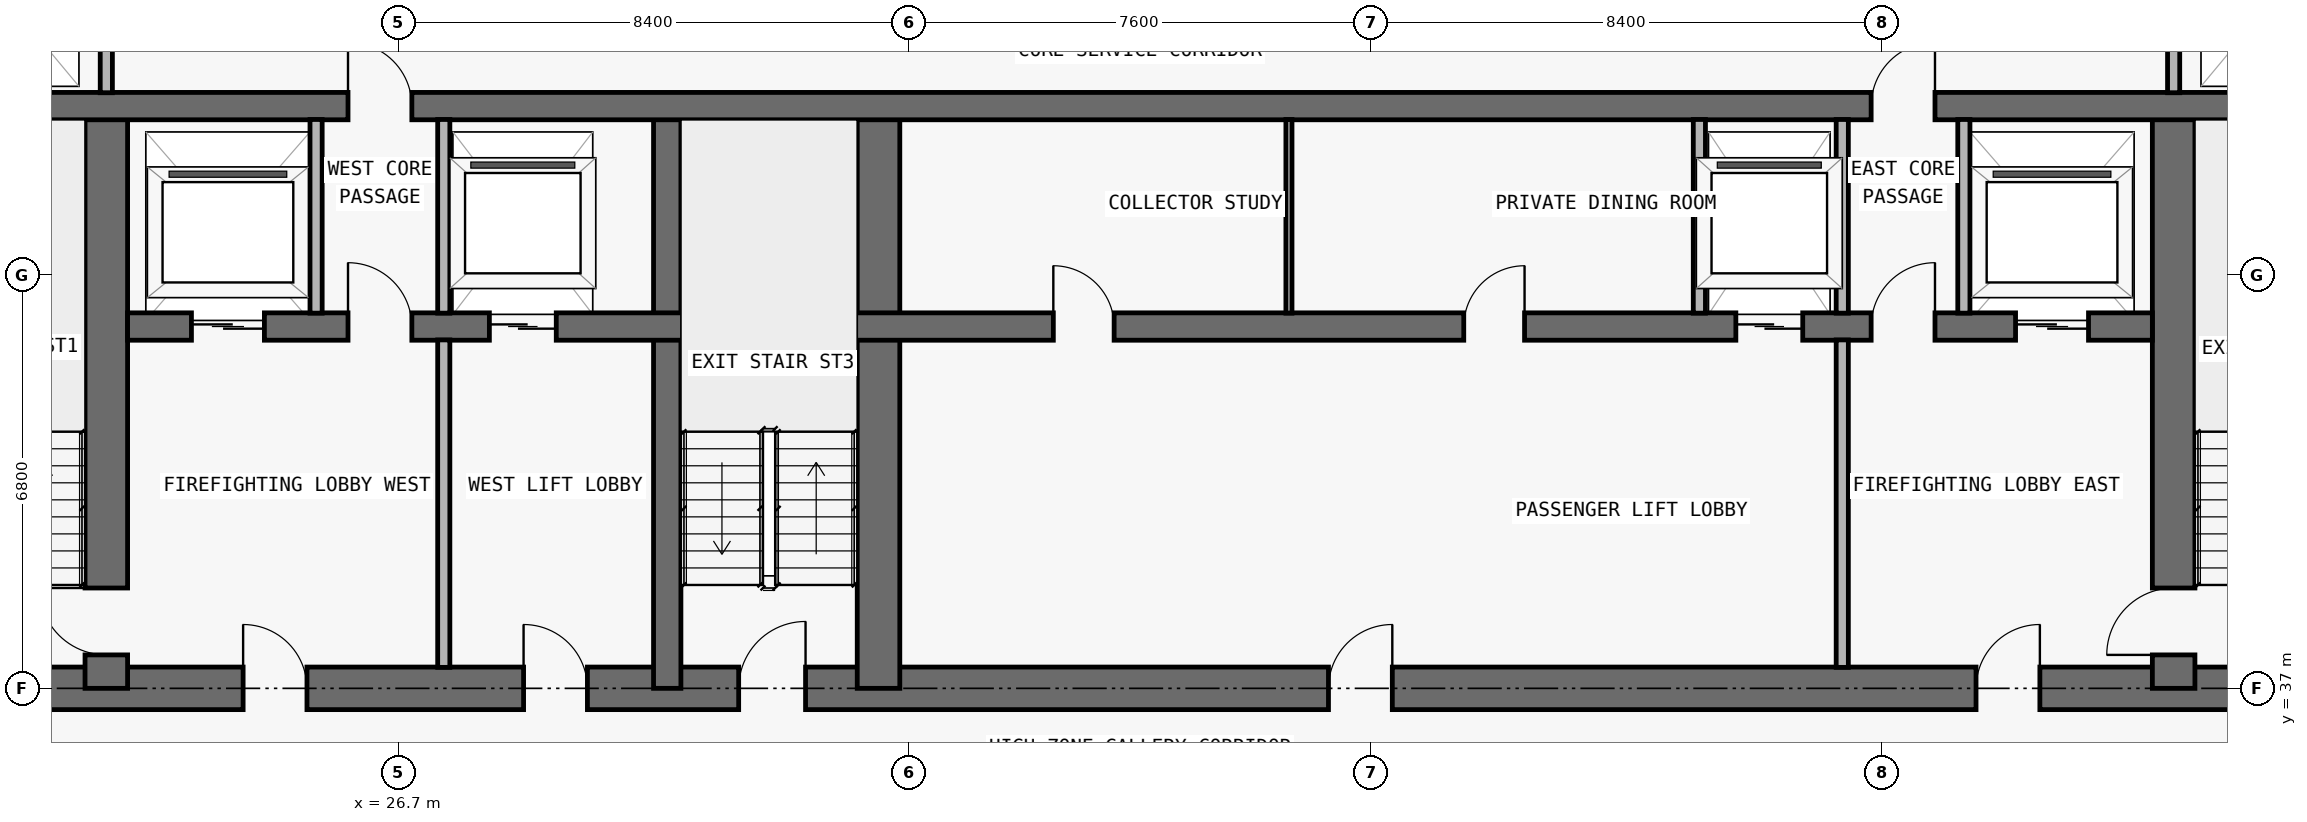
"""IFC4 building model, lengths in metres.
Left out: names, types, materials, properties, quantities, classifications, styles, units other than length and angle.
Written with IfcOpenShell. Run it as: python <this file> out.ifc"""

import sys

from ifc_helpers import new_model, si_unit, direction, frame, frame_2d, origin, place, context, subcontext, project, spatial, rectangle, extrude, element, fill, save


model = new_model("IFC4")
c1 = context("Model", 3, precision=1e-05, world=origin(), true_north=direction((0.0, 1.0)))
c2 = subcontext(c1, "Body", "Model", "MODEL_VIEW")
j1 = project(units=[si_unit("LENGTHUNIT", "METRE"), si_unit("PLANEANGLEUNIT", "RADIAN")], contexts=[c1])
p1 = place(None, origin())
s1 = spatial("IfcSite", under=j1, at=p1, CompositionType="ELEMENT")
p2 = place(p1, origin())
s2 = spatial("IfcBuilding", under=s1, at=p2, CompositionType="ELEMENT")
p3 = place(p2, frame((0.0, 0.0, 214.8)))
s3 = spatial("IfcBuildingStorey", under=s2, at=p3, CompositionType="ELEMENT", Elevation=214.8)
p4 = place(p3, frame((17.95, 37.0, 0.0), z_axis=(0.0, 0.0, 1.0), x_axis=(1.0, 0.0, 0.0)))
e1 = element("IfcWall", 1, at=p4, inside=s3, PredefinedType="SHEAR", context=c2, shape_type="SweptSolid", body=[
    extrude(rectangle(XDim=41.9, YDim=0.7, at=frame_2d((20.95, 0.0))), origin(), (0.0, 0.0, 1.0), 3.05),
])
p5 = place(p4, frame((14.35, 0.0, 0.0)))
e2 = element("IfcOpeningElement", 2, at=p5, cuts=e1, PredefinedType="OPENING", context=c2, shape_type="SweptSolid", body=[
    extrude(rectangle(XDim=1.1, YDim=2.15, at=frame_2d((0.55, 1.075))), frame((0.0, 0.36, 0.0), z_axis=(0.0, -1.0, 0.0), x_axis=(1.0, 0.0, 0.0)), (0.0, 0.0, 1.0), 0.72),
])
p6 = place(p4, frame((6.2, 0.0, 0.0)))
e3 = element("IfcOpeningElement", 3, at=p6, cuts=e1, PredefinedType="OPENING", context=c2, shape_type="SweptSolid", body=[
    extrude(rectangle(XDim=1.05, YDim=2.15, at=frame_2d((0.525, 1.075))), frame((0.0, 0.36, 0.0), z_axis=(0.0, -1.0, 0.0), x_axis=(1.0, 0.0, 0.0)), (0.0, 0.0, 1.0), 0.72),
])
p7 = place(p4, frame((34.7, 0.0, 0.0)))
e4 = element("IfcOpeningElement", 4, at=p7, cuts=e1, PredefinedType="OPENING", context=c2, shape_type="SweptSolid", body=[
    extrude(rectangle(XDim=1.05, YDim=2.15, at=frame_2d((0.525, 1.075))), frame((0.0, 0.36, 0.0), z_axis=(0.0, -1.0, 0.0), x_axis=(1.0, 0.0, 0.0)), (0.0, 0.0, 1.0), 0.72),
])
p8 = place(p4, frame((10.812, 0.0, 0.0)))
e5 = element("IfcOpeningElement", 5, at=p8, cuts=e1, PredefinedType="OPENING", context=c2, shape_type="SweptSolid", body=[
    extrude(rectangle(XDim=1.05, YDim=2.15, at=frame_2d((0.525, 1.075))), frame((0.0, 0.36, 0.0), z_axis=(0.0, -1.0, 0.0), x_axis=(1.0, 0.0, 0.0)), (0.0, 0.0, 1.0), 0.72),
])
p9 = place(p4, frame((24.05, 0.0, 0.0)))
e6 = element("IfcOpeningElement", 6, at=p9, cuts=e1, PredefinedType="OPENING", context=c2, shape_type="SweptSolid", body=[
    extrude(rectangle(XDim=1.05, YDim=2.15, at=frame_2d((0.525, 1.075))), frame((0.0, 0.36, 0.0), z_axis=(0.0, -1.0, 0.0), x_axis=(1.0, 0.0, 0.0)), (0.0, 0.0, 1.0), 0.72),
])
p10 = place(p3, frame((21.9, 37.0, 0.0), z_axis=(0.0, 0.0, 1.0), x_axis=(0.0, 1.0, 0.0)))
e7 = element("IfcWall", 7, at=p10, inside=s3, PredefinedType="SHEAR", context=c2, shape_type="SweptSolid", body=[
    extrude(rectangle(XDim=9.575, YDim=0.7, at=frame_2d((4.788, 0.0))), origin(), (0.0, 0.0, 1.0), 3.05),
])
p11 = place(p10, frame((0.55, 0.0, 0.0)))
e8 = element("IfcOpeningElement", 8, at=p11, cuts=e7, PredefinedType="OPENING", context=c2, shape_type="SweptSolid", body=[
    extrude(rectangle(XDim=1.1, YDim=2.15, at=frame_2d((0.55, 1.075))), frame((0.0, 0.36, 0.0), z_axis=(0.0, -1.0, 0.0), x_axis=(1.0, 0.0, 0.0)), (0.0, 0.0, 1.0), 0.72),
])
p12 = place(p3, frame((55.9, 37.0, 0.0), z_axis=(0.0, 0.0, 1.0), x_axis=(0.0, 1.0, 0.0)))
e9 = element("IfcWall", 9, at=p12, inside=s3, PredefinedType="SHEAR", context=c2, shape_type="SweptSolid", body=[
    extrude(rectangle(XDim=9.575, YDim=0.7, at=frame_2d((4.788, 0.0))), origin(), (0.0, 0.0, 1.0), 3.05),
])
p13 = place(p12, frame((0.55, 0.0, 0.0)))
e10 = element("IfcOpeningElement", 10, at=p13, cuts=e9, PredefinedType="OPENING", context=c2, shape_type="SweptSolid", body=[
    extrude(rectangle(XDim=1.1, YDim=2.15, at=frame_2d((0.55, 1.075))), frame((0.0, 0.36, 0.0), z_axis=(0.0, -1.0, 0.0), x_axis=(1.0, 0.0, 0.0)), (0.0, 0.0, 1.0), 0.72),
])
p14 = place(p3, frame((31.125, 37.0, 0.0), z_axis=(0.0, 0.0, 1.0), x_axis=(0.0, 1.0, 0.0)))
e11 = element("IfcWall", 11, at=p14, inside=s3, PredefinedType="SHEAR", context=c2, shape_type="SweptSolid", body=[
    extrude(rectangle(XDim=9.575, YDim=0.45, at=frame_2d((4.788, 0.0))), origin(), (0.0, 0.0, 1.0), 3.05),
])
p15 = place(p3, frame((34.6, 37.0, 0.0), z_axis=(0.0, 0.0, 1.0), x_axis=(0.0, 1.0, 0.0)))
e12 = element("IfcWall", 12, at=p15, inside=s3, PredefinedType="SHEAR", context=c2, shape_type="SweptSolid", body=[
    extrude(rectangle(XDim=9.575, YDim=0.7, at=frame_2d((4.788, 0.0))), origin(), (0.0, 0.0, 1.0), 3.05),
])
p16 = place(p3, frame((22.25, 42.95, 0.0), z_axis=(0.0, 0.0, 1.0), x_axis=(1.0, 0.0, 0.0)))
e13 = element("IfcWall", 13, at=p16, inside=s3, PredefinedType="SHEAR", context=c2, shape_type="SweptSolid", body=[
    extrude(rectangle(XDim=33.3, YDim=0.45, at=frame_2d((16.65, 0.0))), origin(), (0.0, 0.0, 1.0), 3.05),
])
p17 = place(p16, frame((1.05, 0.0, 0.0)))
e14 = element("IfcOpeningElement", 14, at=p17, cuts=e13, PredefinedType="OPENING", context=c2, shape_type="SweptSolid", body=[
    extrude(rectangle(XDim=1.2, YDim=2.2, at=frame_2d((0.6, 1.1))), frame((0.0, 0.235, 0.0), z_axis=(0.0, -1.0, 0.0), x_axis=(1.0, 0.0, 0.0)), (0.0, 0.0, 1.0), 0.47),
])
p18 = place(p16, frame((31.05, 0.0, 0.0)))
e15 = element("IfcOpeningElement", 15, at=p18, cuts=e13, PredefinedType="OPENING", context=c2, shape_type="SweptSolid", body=[
    extrude(rectangle(XDim=1.2, YDim=2.2, at=frame_2d((0.6, 1.1))), frame((0.0, 0.235, 0.0), z_axis=(0.0, -1.0, 0.0), x_axis=(1.0, 0.0, 0.0)), (0.0, 0.0, 1.0), 0.47),
])
p19 = place(p16, frame((26.45, 0.0, 0.0)))
e16 = element("IfcOpeningElement", 16, at=p19, cuts=e13, PredefinedType="OPENING", context=c2, shape_type="SweptSolid", body=[
    extrude(rectangle(XDim=1.1, YDim=2.2, at=frame_2d((0.55, 1.1))), frame((0.0, 0.235, 0.0), z_axis=(0.0, -1.0, 0.0), x_axis=(1.0, 0.0, 0.0)), (0.0, 0.0, 1.0), 0.47),
])
p20 = place(p16, frame((5.95, 0.0, 0.0)))
e17 = element("IfcOpeningElement", 17, at=p20, cuts=e13, PredefinedType="OPENING", context=c2, shape_type="SweptSolid", body=[
    extrude(rectangle(XDim=1.1, YDim=2.2, at=frame_2d((0.55, 1.1))), frame((0.0, 0.235, 0.0), z_axis=(0.0, -1.0, 0.0), x_axis=(1.0, 0.0, 0.0)), (0.0, 0.0, 1.0), 0.47),
])
p21 = place(p16, frame((3.625, 0.0, 0.0)))
e18 = element("IfcOpeningElement", 18, at=p21, cuts=e13, PredefinedType="OPENING", context=c2, shape_type="SweptSolid", body=[
    extrude(rectangle(XDim=1.05, YDim=2.15, at=frame_2d((0.525, 1.075))), frame((0.0, 0.235, 0.0), z_axis=(0.0, -1.0, 0.0), x_axis=(1.0, 0.0, 0.0)), (0.0, 0.0, 1.0), 0.47),
])
p22 = place(p16, frame((28.675, 0.0, 0.0)))
e19 = element("IfcOpeningElement", 19, at=p22, cuts=e13, PredefinedType="OPENING", context=c2, shape_type="SweptSolid", body=[
    extrude(rectangle(XDim=1.05, YDim=2.15, at=frame_2d((0.525, 1.075))), frame((0.0, 0.235, 0.0), z_axis=(0.0, -1.0, 0.0), x_axis=(1.0, 0.0, 0.0)), (0.0, 0.0, 1.0), 0.47),
])
p23 = place(p16, frame((15.225, 0.0, 0.0)))
e20 = element("IfcOpeningElement", 20, at=p23, cuts=e13, PredefinedType="OPENING", context=c2, shape_type="SweptSolid", body=[
    extrude(rectangle(XDim=1.0, YDim=2.2, at=frame_2d((0.5, 1.1))), frame((0.0, 0.235, 0.0), z_axis=(0.0, -1.0, 0.0), x_axis=(1.0, 0.0, 0.0)), (0.0, 0.0, 1.0), 0.47),
])
p24 = place(p16, frame((21.975, 0.0, 0.0)))
e21 = element("IfcOpeningElement", 21, at=p24, cuts=e13, PredefinedType="OPENING", context=c2, shape_type="SweptSolid", body=[
    extrude(rectangle(XDim=1.0, YDim=2.2, at=frame_2d((0.5, 1.1))), frame((0.0, 0.235, 0.0), z_axis=(0.0, -1.0, 0.0), x_axis=(1.0, 0.0, 0.0)), (0.0, 0.0, 1.0), 0.47),
])
p25 = place(p3, frame((18.3, 46.575, 0.0), z_axis=(0.0, 0.0, 1.0), x_axis=(1.0, 0.0, 0.0)))
e22 = element("IfcWall", 22, at=p25, inside=s3, PredefinedType="SHEAR", context=c2, shape_type="SweptSolid", body=[
    extrude(rectangle(XDim=41.2, YDim=0.45, at=frame_2d((20.6, 0.0))), origin(), (0.0, 0.0, 1.0), 3.05),
])
p26 = place(p25, frame((7.575, 0.0, 0.0)))
e23 = element("IfcOpeningElement", 23, at=p26, cuts=e22, PredefinedType="OPENING", context=c2, shape_type="SweptSolid", body=[
    extrude(rectangle(XDim=1.05, YDim=2.15, at=frame_2d((0.525, 1.075))), frame((0.0, 0.235, 0.0), z_axis=(0.0, -1.0, 0.0), x_axis=(1.0, 0.0, 0.0)), (0.0, 0.0, 1.0), 0.47),
])
p27 = place(p25, frame((32.625, 0.0, 0.0)))
e24 = element("IfcOpeningElement", 24, at=p27, cuts=e22, PredefinedType="OPENING", context=c2, shape_type="SweptSolid", body=[
    extrude(rectangle(XDim=1.05, YDim=2.15, at=frame_2d((0.525, 1.075))), frame((0.0, 0.235, 0.0), z_axis=(0.0, -1.0, 0.0), x_axis=(1.0, 0.0, 0.0)), (0.0, 0.0, 1.0), 0.47),
])
p28 = place(p3, frame((21.9, 46.795, 0.0), z_axis=(0.0, 0.0, 1.0), x_axis=(0.0, 1.0, 0.0)))
e25 = element("IfcWall", 25, at=p28, inside=s3, PredefinedType="PARTITIONING", context=c2, shape_type="SweptSolid", body=[
    extrude(rectangle(XDim=3.16, YDim=0.2, at=frame_2d((1.58, 0.0))), origin(), (0.0, 0.0, 1.0), 3.05),
])
p29 = place(p3, frame((25.35, 43.17, 0.0), z_axis=(0.0, 0.0, 1.0), x_axis=(0.0, 1.0, 0.0)))
e26 = element("IfcWall", 26, at=p29, inside=s3, PredefinedType="PARTITIONING", context=c2, shape_type="SweptSolid", body=[
    extrude(rectangle(XDim=3.185, YDim=0.2, at=frame_2d((1.593, 0.0))), origin(), (0.0, 0.0, 1.0), 3.05),
])
p30 = place(p3, frame((27.45, 37.345, 0.0), z_axis=(0.0, 0.0, 1.0), x_axis=(0.0, 1.0, 0.0)))
e27 = element("IfcWall", 27, at=p30, inside=s3, PredefinedType="PARTITIONING", context=c2, shape_type="SweptSolid", body=[
    extrude(rectangle(XDim=5.385, YDim=0.2, at=frame_2d((2.692, 0.0))), origin(), (0.0, 0.0, 1.0), 3.05),
])
p31 = place(p3, frame((27.45, 43.17, 0.0), z_axis=(0.0, 0.0, 1.0), x_axis=(0.0, 1.0, 0.0)))
e28 = element("IfcWall", 28, at=p31, inside=s3, PredefinedType="PARTITIONING", context=c2, shape_type="SweptSolid", body=[
    extrude(rectangle(XDim=3.185, YDim=0.2, at=frame_2d((1.593, 0.0))), origin(), (0.0, 0.0, 1.0), 3.05),
])
p32 = place(p3, frame((41.35, 43.17, 0.0), z_axis=(0.0, 0.0, 1.0), x_axis=(0.0, 1.0, 0.0)))
e29 = element("IfcWall", 29, at=p32, inside=s3, PredefinedType="MOVABLE", context=c2, shape_type="SweptSolid", body=[
    extrude(rectangle(XDim=3.185, YDim=0.1, at=frame_2d((1.593, 0.0))), origin(), (0.0, 0.0, 1.0), 3.05),
])
p33 = place(p3, frame((48.1, 43.17, 0.0), z_axis=(0.0, 0.0, 1.0), x_axis=(0.0, 1.0, 0.0)))
e30 = element("IfcWall", 30, at=p33, inside=s3, PredefinedType="PARTITIONING", context=c2, shape_type="SweptSolid", body=[
    extrude(rectangle(XDim=3.185, YDim=0.2, at=frame_2d((1.593, 0.0))), origin(), (0.0, 0.0, 1.0), 3.05),
])
p34 = place(p3, frame((50.45, 37.345, 0.0), z_axis=(0.0, 0.0, 1.0), x_axis=(0.0, 1.0, 0.0)))
e31 = element("IfcWall", 31, at=p34, inside=s3, PredefinedType="PARTITIONING", context=c2, shape_type="SweptSolid", body=[
    extrude(rectangle(XDim=5.385, YDim=0.2, at=frame_2d((2.692, 0.0))), origin(), (0.0, 0.0, 1.0), 3.05),
])
for number, where, z_axis, x_axis in (
    (32, (50.45, 43.17, 0.0), (0.0, 0.0, 1.0), (0.0, 1.0, 0.0)),
    (33, (52.45, 43.17, 0.0), (0.0, 0.0, 1.0), (0.0, 1.0, 0.0)),
):
    element("IfcWall", number, at=place(p3, frame(where, z_axis=z_axis, x_axis=x_axis)), inside=s3, PredefinedType="PARTITIONING", context=c2, shape_type="SweptSolid", body=[
        extrude(rectangle(XDim=3.185, YDim=0.2, at=frame_2d((1.593, 0.0))), origin(), (0.0, 0.0, 1.0), 3.05),
    ])
p35 = place(p3, frame((55.9, 46.795, 0.0), z_axis=(0.0, 0.0, 1.0), x_axis=(0.0, 1.0, 0.0)))
e34 = element("IfcWall", 34, at=p35, inside=s3, PredefinedType="PARTITIONING", context=c2, shape_type="SweptSolid", body=[
    extrude(rectangle(XDim=3.16, YDim=0.2, at=frame_2d((1.58, 0.0))), origin(), (0.0, 0.0, 1.0), 3.05),
])
p36 = place(p17, origin())
e35 = element("IfcDoor", 35, at=p36, inside=s3, OperationType="DOUBLE_DOOR_SLIDING", PredefinedType="DOOR", context=c2, shape_type="SweptSolid", body=[
    extrude(rectangle(XDim=1.2, YDim=2.2, at=frame_2d((0.6, 1.1))), frame((0.0, 0.025, 0.0), z_axis=(0.0, -1.0, 0.0), x_axis=(1.0, 0.0, 0.0)), (0.0, 0.0, 1.0), 0.05),
])
fill(e14, e35)
p37 = place(p18, origin())
e36 = element("IfcDoor", 36, at=p37, inside=s3, OperationType="DOUBLE_DOOR_SLIDING", PredefinedType="DOOR", context=c2, shape_type="SweptSolid", body=[
    extrude(rectangle(XDim=1.2, YDim=2.2, at=frame_2d((0.6, 1.1))), frame((0.0, 0.025, 0.0), z_axis=(0.0, -1.0, 0.0), x_axis=(1.0, 0.0, 0.0)), (0.0, 0.0, 1.0), 0.05),
])
fill(e15, e36)
p38 = place(p19, origin())
e37 = element("IfcDoor", 37, at=p38, inside=s3, OperationType="DOUBLE_DOOR_SLIDING", PredefinedType="DOOR", context=c2, shape_type="SweptSolid", body=[
    extrude(rectangle(XDim=1.1, YDim=2.2, at=frame_2d((0.55, 1.1))), frame((0.0, 0.025, 0.0), z_axis=(0.0, -1.0, 0.0), x_axis=(1.0, 0.0, 0.0)), (0.0, 0.0, 1.0), 0.05),
])
fill(e16, e37)
p39 = place(p20, origin())
e38 = element("IfcDoor", 38, at=p39, inside=s3, OperationType="DOUBLE_DOOR_SLIDING", PredefinedType="DOOR", context=c2, shape_type="SweptSolid", body=[
    extrude(rectangle(XDim=1.1, YDim=2.2, at=frame_2d((0.55, 1.1))), frame((0.0, 0.025, 0.0), z_axis=(0.0, -1.0, 0.0), x_axis=(1.0, 0.0, 0.0)), (0.0, 0.0, 1.0), 0.05),
])
fill(e17, e38)
p40 = place(p5, origin())
e39 = element("IfcDoor", 39, at=p40, inside=s3, OperationType="SINGLE_SWING_RIGHT", PredefinedType="DOOR", context=c2, shape_type="SweptSolid", body=[
    extrude(rectangle(XDim=1.1, YDim=2.15, at=frame_2d((0.55, 1.075))), frame((0.0, 0.025, 0.0), z_axis=(0.0, -1.0, 0.0), x_axis=(1.0, 0.0, 0.0)), (0.0, 0.0, 1.0), 0.05),
])
fill(e2, e39)
p41 = place(p6, origin())
e40 = element("IfcDoor", 40, at=p41, inside=s3, OperationType="SINGLE_SWING_LEFT", PredefinedType="DOOR", context=c2, shape_type="SweptSolid", body=[
    extrude(rectangle(XDim=1.05, YDim=2.15, at=frame_2d((0.525, 1.075))), frame((0.0, 0.025, 0.0), z_axis=(0.0, -1.0, 0.0), x_axis=(1.0, 0.0, 0.0)), (0.0, 0.0, 1.0), 0.05),
])
fill(e3, e40)
p42 = place(p11, origin())
e41 = element("IfcDoor", 41, at=p42, inside=s3, OperationType="SINGLE_SWING_RIGHT", PredefinedType="DOOR", context=c2, shape_type="SweptSolid", body=[
    extrude(rectangle(XDim=1.1, YDim=2.15, at=frame_2d((0.55, 1.075))), frame((0.0, 0.025, 0.0), z_axis=(0.0, -1.0, 0.0), x_axis=(1.0, 0.0, 0.0)), (0.0, 0.0, 1.0), 0.05),
])
fill(e8, e41)
p43 = place(p21, origin())
e42 = element("IfcDoor", 42, at=p43, inside=s3, OperationType="SINGLE_SWING_LEFT", PredefinedType="DOOR", context=c2, shape_type="SweptSolid", body=[
    extrude(rectangle(XDim=1.05, YDim=2.15, at=frame_2d((0.525, 1.075))), frame((0.0, 0.025, 0.0), z_axis=(0.0, -1.0, 0.0), x_axis=(1.0, 0.0, 0.0)), (0.0, 0.0, 1.0), 0.05),
])
fill(e18, e42)
p44 = place(p7, origin())
e43 = element("IfcDoor", 43, at=p44, inside=s3, OperationType="SINGLE_SWING_RIGHT", PredefinedType="DOOR", context=c2, shape_type="SweptSolid", body=[
    extrude(rectangle(XDim=1.05, YDim=2.15, at=frame_2d((0.525, 1.075))), frame((0.0, 0.025, 0.0), z_axis=(0.0, -1.0, 0.0), x_axis=(1.0, 0.0, 0.0)), (0.0, 0.0, 1.0), 0.05),
])
fill(e4, e43)
p45 = place(p13, origin())
e44 = element("IfcDoor", 44, at=p45, inside=s3, OperationType="SINGLE_SWING_LEFT", PredefinedType="DOOR", context=c2, shape_type="SweptSolid", body=[
    extrude(rectangle(XDim=1.1, YDim=2.15, at=frame_2d((0.55, 1.075))), frame((0.0, 0.025, 0.0), z_axis=(0.0, -1.0, 0.0), x_axis=(1.0, 0.0, 0.0)), (0.0, 0.0, 1.0), 0.05),
])
fill(e10, e44)
p46 = place(p22, origin())
e45 = element("IfcDoor", 45, at=p46, inside=s3, OperationType="SINGLE_SWING_RIGHT", PredefinedType="DOOR", context=c2, shape_type="SweptSolid", body=[
    extrude(rectangle(XDim=1.05, YDim=2.15, at=frame_2d((0.525, 1.075))), frame((0.0, 0.025, 0.0), z_axis=(0.0, -1.0, 0.0), x_axis=(1.0, 0.0, 0.0)), (0.0, 0.0, 1.0), 0.05),
])
fill(e19, e45)
p47 = place(p8, origin())
e46 = element("IfcDoor", 46, at=p47, inside=s3, OperationType="SINGLE_SWING_LEFT", PredefinedType="DOOR", context=c2, shape_type="SweptSolid", body=[
    extrude(rectangle(XDim=1.05, YDim=2.15, at=frame_2d((0.525, 1.075))), frame((0.0, 0.025, 0.0), z_axis=(0.0, -1.0, 0.0), x_axis=(1.0, 0.0, 0.0)), (0.0, 0.0, 1.0), 0.05),
])
fill(e5, e46)
p48 = place(p9, origin())
e47 = element("IfcDoor", 47, at=p48, inside=s3, OperationType="SINGLE_SWING_RIGHT", PredefinedType="DOOR", context=c2, shape_type="SweptSolid", body=[
    extrude(rectangle(XDim=1.05, YDim=2.15, at=frame_2d((0.525, 1.075))), frame((0.0, 0.025, 0.0), z_axis=(0.0, -1.0, 0.0), x_axis=(1.0, 0.0, 0.0)), (0.0, 0.0, 1.0), 0.05),
])
fill(e6, e47)
p49 = place(p23, origin())
e48 = element("IfcDoor", 48, at=p49, inside=s3, OperationType="SINGLE_SWING_LEFT", PredefinedType="DOOR", context=c2, shape_type="SweptSolid", body=[
    extrude(rectangle(XDim=1.0, YDim=2.2, at=frame_2d((0.5, 1.1))), frame((0.0, 0.025, 0.0), z_axis=(0.0, -1.0, 0.0), x_axis=(1.0, 0.0, 0.0)), (0.0, 0.0, 1.0), 0.05),
])
fill(e20, e48)
p50 = place(p24, origin())
e49 = element("IfcDoor", 49, at=p50, inside=s3, OperationType="SINGLE_SWING_RIGHT", PredefinedType="DOOR", context=c2, shape_type="SweptSolid", body=[
    extrude(rectangle(XDim=1.0, YDim=2.2, at=frame_2d((0.5, 1.1))), frame((0.0, 0.025, 0.0), z_axis=(0.0, -1.0, 0.0), x_axis=(1.0, 0.0, 0.0)), (0.0, 0.0, 1.0), 0.05),
])
fill(e21, e49)
p51 = place(p26, origin())
e50 = element("IfcDoor", 50, at=p51, inside=s3, OperationType="SINGLE_SWING_LEFT", PredefinedType="DOOR", context=c2, shape_type="SweptSolid", body=[
    extrude(rectangle(XDim=1.05, YDim=2.15, at=frame_2d((0.525, 1.075))), frame((0.0, 0.025, 0.0), z_axis=(0.0, -1.0, 0.0), x_axis=(1.0, 0.0, 0.0)), (0.0, 0.0, 1.0), 0.05),
])
fill(e23, e50)
p52 = place(p27, origin())
e51 = element("IfcDoor", 51, at=p52, inside=s3, OperationType="SINGLE_SWING_RIGHT", PredefinedType="DOOR", context=c2, shape_type="SweptSolid", body=[
    extrude(rectangle(XDim=1.05, YDim=2.15, at=frame_2d((0.525, 1.075))), frame((0.0, 0.025, 0.0), z_axis=(0.0, -1.0, 0.0), x_axis=(1.0, 0.0, 0.0)), (0.0, 0.0, 1.0), 0.05),
])
fill(e24, e51)
save(model, sys.argv[1])
